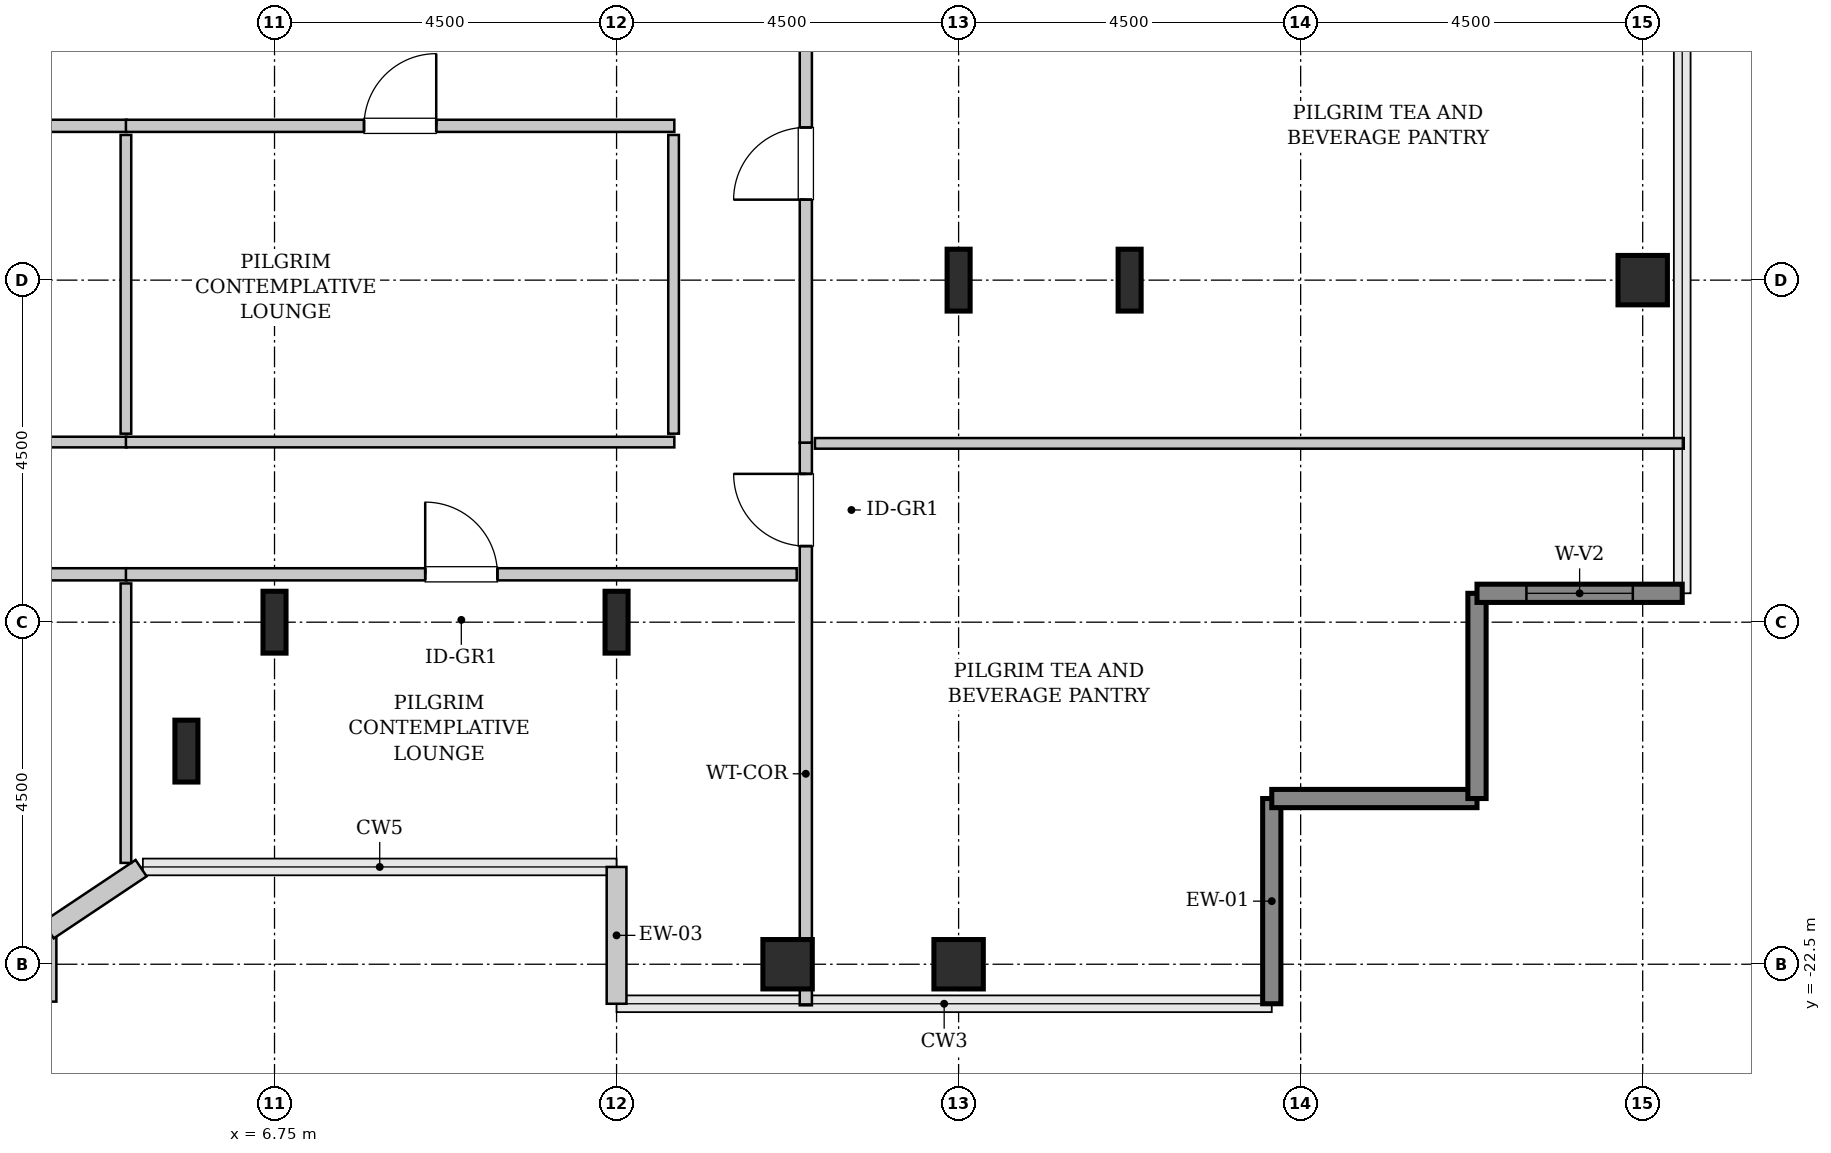
"""IFC4 building model, lengths in metres.
Left out: names, types, materials, properties, quantities, classifications, styles, units other than length and angle.
Written with IfcOpenShell. Run it as: python <this file> out.ifc"""

import sys

from ifc_helpers import new_model, si_unit, direction, frame, frame_2d, origin, origin_2d, place, context, subcontext, project, spatial, rectangle, hollow_rectangle, i_section, extrude, source, transform, mapped, element, fill, save


model = new_model("IFC4")
c1 = context("Model", 3, precision=1e-05, world=origin(), true_north=direction((0.0, 1.0)))
c2 = subcontext(c1, "Body", "Model", "MODEL_VIEW")
j1 = project(units=[si_unit("LENGTHUNIT", "METRE"), si_unit("PLANEANGLEUNIT", "RADIAN")], contexts=[c1])
p1 = place(None, origin())
s1 = spatial("IfcSite", under=j1, at=p1, CompositionType="ELEMENT")
p2 = place(p1, origin())
s2 = spatial("IfcBuilding", under=s1, at=p2, CompositionType="ELEMENT")
p3 = place(p2, frame((0.0, 0.0, 244.6)))
s3 = spatial("IfcBuildingStorey", under=s2, at=p3, CompositionType="ELEMENT", Elevation=244.6)
m1 = source(origin(), c2, "Body", "SweptSolid", [
    extrude(i_section(OverallWidth=0.303, OverallDepth=0.814, WebThickness=0.021, FlangeThickness=0.04, FilletRadius=0.03, at=origin_2d()), origin(), (0.0, 0.0, 1.0), 3.8),
])
for number, where, z_axis, x_axis in (
    (1, (5.591, -19.696, 0.0), (0.0, 0.0, 1.0), (1.0, 0.0, 0.0)),
    (2, (6.75, -18.0, 0.0), (0.0, 0.0, 1.0), (1.0, 0.0, 0.0)),
    (3, (11.25, -18.0, 0.0), (0.0, 0.0, 1.0), (1.0, 0.0, 0.0)),
):
    element("IfcColumn", number, at=place(p3, frame(where, z_axis=z_axis, x_axis=x_axis)), inside=s3, PredefinedType="COLUMN", context=c2, shape_type="MappedRepresentation", body=[
        mapped(m1, transform((0.0, 0.0, 0.0), x_axis=(1.0, 0.0, 0.0), y_axis=(0.0, 1.0, 0.0), z_axis=(0.0, 0.0, 1.0), scale=1.0)),
    ])
m2 = source(origin(), c2, "Body", "SweptSolid", [
    extrude(hollow_rectangle(XDim=0.65, YDim=0.65, WallThickness=0.032, InnerFilletRadius=0.032, OuterFilletRadius=0.064, at=origin_2d()), origin(), (0.0, 0.0, 1.0), 3.8),
])
for number, where, z_axis, x_axis in (
    (4, (13.5, -22.5, 0.0), (0.0, 0.0, 1.0), (1.0, 0.0, 0.0)),
    (5, (15.75, -22.5, 0.0), (0.0, 0.0, 1.0), (1.0, 0.0, 0.0)),
):
    element("IfcColumn", number, at=place(p3, frame(where, z_axis=z_axis, x_axis=x_axis)), inside=s3, PredefinedType="COLUMN", context=c2, shape_type="MappedRepresentation", body=[
        mapped(m2, transform((0.0, 0.0, 0.0), x_axis=(1.0, 0.0, 0.0), y_axis=(0.0, 1.0, 0.0), z_axis=(0.0, 0.0, 1.0), scale=1.0)),
    ])
for number, where, z_axis, x_axis in (
    (6, (15.75, -13.5, 0.0), (0.0, 0.0, 1.0), (1.0, 0.0, 0.0)),
    (7, (18.0, -13.5, 0.0), (0.0, 0.0, 1.0), (1.0, 0.0, 0.0)),
):
    element("IfcColumn", number, at=place(p3, frame(where, z_axis=z_axis, x_axis=x_axis)), inside=s3, PredefinedType="COLUMN", context=c2, shape_type="MappedRepresentation", body=[
        mapped(m1, transform((0.0, 0.0, 0.0), x_axis=(1.0, 0.0, 0.0), y_axis=(0.0, 1.0, 0.0), z_axis=(0.0, 0.0, 1.0), scale=1.0)),
    ])
p4 = place(p3, frame((24.75, -13.5, 0.0), z_axis=(0.0, 0.0, 1.0), x_axis=(1.0, 0.0, 0.0)))
e8 = element("IfcColumn", 8, at=p4, inside=s3, PredefinedType="COLUMN", context=c2, shape_type="MappedRepresentation", body=[
    mapped(m2, transform((0.0, 0.0, 0.0), x_axis=(1.0, 0.0, 0.0), y_axis=(0.0, 1.0, 0.0), z_axis=(0.0, 0.0, 1.0), scale=1.0)),
])
m3 = source(origin(), c2, "Body", "SweptSolid", [
    extrude(rectangle(XDim=1.8, YDim=0.26, at=frame_2d((0.9, 0.0))), origin(), (0.0, 0.0, 1.0), 3.55),
])
p5 = place(p3, frame((11.25, -21.22, 0.0), z_axis=(0.0, 0.0, 1.0), x_axis=(0.0, -1.0, 0.0)))
e9 = element("IfcWall", 9, at=p5, inside=s3, PredefinedType="SOLIDWALL", context=c2, shape_type="MappedRepresentation", body=[
    mapped(m3, transform((0.0, 0.0, 0.0), x_axis=(1.0, 0.0, 0.0), y_axis=(0.0, 1.0, 0.0), z_axis=(0.0, 0.0, 1.0), scale=1.0)),
])
m4 = source(origin(), c2, "Body", "SweptSolid", [
    extrude(rectangle(XDim=2.7, YDim=0.24, at=frame_2d((1.35, 0.0))), origin(), (0.0, 0.0, 1.0), 3.55),
])
for number, where, z_axis, x_axis in (
    (10, (19.87, -23.02, 0.0), (0.0, 0.0, 1.0), (0.0, 1.0, 0.0)),
    (11, (19.87, -20.32, 0.0), (0.0, 0.0, 1.0), (1.0, 0.0, 0.0)),
    (12, (22.57, -20.32, 0.0), (0.0, 0.0, 1.0), (0.0, 1.0, 0.0)),
):
    element("IfcWall", number, at=place(p3, frame(where, z_axis=z_axis, x_axis=x_axis)), inside=s3, PredefinedType="SHEAR", context=c2, shape_type="MappedRepresentation", body=[
        mapped(m4, transform((0.0, 0.0, 0.0), x_axis=(1.0, 0.0, 0.0), y_axis=(0.0, 1.0, 0.0), z_axis=(0.0, 0.0, 1.0), scale=1.0)),
    ])
p6 = place(p3, frame((22.57, -17.62, 0.0), z_axis=(0.0, 0.0, 1.0), x_axis=(1.0, 0.0, 0.0)))
e13 = element("IfcWall", 13, at=p6, inside=s3, PredefinedType="SHEAR", context=c2, shape_type="MappedRepresentation", body=[
    mapped(m4, transform((0.0, 0.0, 0.0), x_axis=(1.0, 0.0, 0.0), y_axis=(0.0, 1.0, 0.0), z_axis=(0.0, 0.0, 1.0), scale=1.0)),
])
p7 = place(p6, frame((0.65, 0.0, 0.85)))
e14 = element("IfcOpeningElement", 14, at=p7, cuts=e13, PredefinedType="OPENING", context=c2, shape_type="SweptSolid", body=[
    extrude(rectangle(XDim=1.4, YDim=1.8, at=frame_2d((0.7, 0.9))), frame((0.0, 0.13, 0.0), z_axis=(0.0, -1.0, 0.0), x_axis=(1.0, 0.0, 0.0)), (0.0, 0.0, 1.0), 0.26),
])
m5 = source(origin(), c2, "Body", "SweptSolid", [
    extrude(rectangle(XDim=0.897, YDim=0.26, at=frame_2d((0.448, 0.0))), origin(), (0.0, 0.0, 1.0), 3.55),
])
p8 = place(p3, frame((3.75, -22.992, 0.0), z_axis=(0.0, 0.0, 1.0), x_axis=(0.0, 1.0, 0.0)))
e15 = element("IfcWall", 15, at=p8, inside=s3, PredefinedType="SOLIDWALL", context=c2, shape_type="MappedRepresentation", body=[
    mapped(m5, transform((0.0, 0.0, 0.0), x_axis=(1.0, 0.0, 0.0), y_axis=(0.0, 1.0, 0.0), z_axis=(0.0, 0.0, 1.0), scale=1.0)),
])
m6 = source(origin(), c2, "Body", "SweptSolid", [
    extrude(rectangle(XDim=1.469, YDim=0.26, at=frame_2d((0.734, 0.0))), origin(), (0.0, 0.0, 1.0), 3.55),
])
p9 = place(p3, frame((3.773, -22.052, 0.0), z_axis=(0.0, 0.0, 1.0), x_axis=(0.831461760506, 0.555581983884, 0.0)))
e16 = element("IfcWall", 16, at=p9, inside=s3, PredefinedType="SOLIDWALL", context=c2, shape_type="MappedRepresentation", body=[
    mapped(m6, transform((0.0, 0.0, 0.0), x_axis=(1.0, 0.0, 0.0), y_axis=(0.0, 1.0, 0.0), z_axis=(0.0, 0.0, 1.0), scale=1.0)),
])
m7 = source(origin(), c2, "Body", "SweptSolid", [
    extrude(rectangle(XDim=7.403, YDim=0.16, at=frame_2d((3.701, 0.0))), origin(), (0.0, 0.0, 1.0), 3.535),
])
p10 = place(p3, frame((13.74, -23.04, 0.0), z_axis=(0.0, 0.0, 1.0), x_axis=(0.0, 1.0, 0.0)))
e17 = element("IfcWall", 17, at=p10, inside=s3, PredefinedType="PARTITIONING", context=c2, shape_type="MappedRepresentation", body=[
    mapped(m7, transform((0.0, 0.0, 0.0), x_axis=(1.0, 0.0, 0.0), y_axis=(0.0, 1.0, 0.0), z_axis=(0.0, 0.0, 1.0), scale=1.0)),
])
p11 = place(p10, frame((6.041, 0.0, 0.0)))
e18 = element("IfcOpeningElement", 18, at=p11, cuts=e17, PredefinedType="OPENING", context=c2, shape_type="SweptSolid", body=[
    extrude(rectangle(XDim=0.95, YDim=2.1, at=frame_2d((0.475, 1.05))), frame((0.0, 0.09, 0.0), z_axis=(0.0, -1.0, 0.0), x_axis=(1.0, 0.0, 0.0)), (0.0, 0.0, 1.0), 0.18),
])
m8 = source(origin(), c2, "Body", "SweptSolid", [
    extrude(rectangle(XDim=11.43, YDim=0.14, at=frame_2d((5.715, 0.0))), origin(), (0.0, 0.0, 1.0), 3.535),
])
p12 = place(p3, frame((13.86, -15.647, 0.0), z_axis=(0.0, 0.0, 1.0), x_axis=(1.0, 0.0, 0.0)))
e19 = element("IfcWall", 19, at=p12, inside=s3, PredefinedType="PARTITIONING", context=c2, shape_type="MappedRepresentation", body=[
    mapped(m8, transform((0.0, 0.0, 0.0), x_axis=(1.0, 0.0, 0.0), y_axis=(0.0, 1.0, 0.0), z_axis=(0.0, 0.0, 1.0), scale=1.0)),
])
m9 = source(origin(), c2, "Body", "SweptSolid", [
    extrude(rectangle(XDim=7.343, YDim=0.16, at=frame_2d((3.671, 0.0))), origin(), (0.0, 0.0, 1.0), 3.535),
])
p13 = place(p3, frame((13.74, -15.637, 0.0), z_axis=(0.0, 0.0, 1.0), x_axis=(0.0, 1.0, 0.0)))
e20 = element("IfcWall", 20, at=p13, inside=s3, PredefinedType="PARTITIONING", context=c2, shape_type="MappedRepresentation", body=[
    mapped(m9, transform((0.0, 0.0, 0.0), x_axis=(1.0, 0.0, 0.0), y_axis=(0.0, 1.0, 0.0), z_axis=(0.0, 0.0, 1.0), scale=1.0)),
])
p14 = place(p13, frame((3.196, 0.0, 0.0)))
e21 = element("IfcOpeningElement", 21, at=p14, cuts=e20, PredefinedType="OPENING", context=c2, shape_type="SweptSolid", body=[
    extrude(rectangle(XDim=0.95, YDim=2.1, at=frame_2d((0.475, 1.05))), frame((0.0, 0.09, 0.0), z_axis=(0.0, -1.0, 0.0), x_axis=(1.0, 0.0, 0.0)), (0.0, 0.0, 1.0), 0.18),
])
m10 = source(origin(), c2, "Body", "SweptSolid", [
    extrude(rectangle(XDim=12.21, YDim=0.16, at=frame_2d((6.105, 0.0))), origin(), (0.0, 0.0, 1.0), 3.535),
])
p15 = place(p3, frame((-7.405, -17.37, 0.0), z_axis=(0.0, 0.0, 1.0), x_axis=(1.0, 0.0, 0.0)))
e22 = element("IfcWall", 22, at=p15, inside=s3, PredefinedType="PARTITIONING", context=c2, shape_type="MappedRepresentation", body=[
    mapped(m10, transform((0.0, 0.0, 0.0), x_axis=(1.0, 0.0, 0.0), y_axis=(0.0, 1.0, 0.0), z_axis=(0.0, 0.0, 1.0), scale=1.0)),
])
p16 = place(p15, frame((5.63, 0.0, 0.0)))
e23 = element("IfcOpeningElement", 23, at=p16, cuts=e22, PredefinedType="OPENING", context=c2, shape_type="SweptSolid", body=[
    extrude(rectangle(XDim=0.95, YDim=2.1, at=frame_2d((0.475, 1.05))), frame((0.0, 0.09, 0.0), z_axis=(0.0, -1.0, 0.0), x_axis=(1.0, 0.0, 0.0)), (0.0, 0.0, 1.0), 0.18),
])
m11 = source(origin(), c2, "Body", "SweptSolid", [
    extrude(rectangle(XDim=3.677, YDim=0.14, at=frame_2d((1.838, 0.0))), origin(), (0.0, 0.0, 1.0), 3.535),
])
p17 = place(p3, frame((4.795, -21.167, 0.0), z_axis=(0.0, 0.0, 1.0), x_axis=(0.0, 1.0, 0.0)))
e24 = element("IfcWall", 24, at=p17, inside=s3, PredefinedType="PARTITIONING", context=c2, shape_type="MappedRepresentation", body=[
    mapped(m11, transform((0.0, 0.0, 0.0), x_axis=(1.0, 0.0, 0.0), y_axis=(0.0, 1.0, 0.0), z_axis=(0.0, 0.0, 1.0), scale=1.0)),
])
p18 = place(p3, frame((-7.405, -11.47, 0.0), z_axis=(0.0, 0.0, 1.0), x_axis=(1.0, 0.0, 0.0)))
e25 = element("IfcWall", 25, at=p18, inside=s3, PredefinedType="PARTITIONING", context=c2, shape_type="MappedRepresentation", body=[
    mapped(m10, transform((0.0, 0.0, 0.0), x_axis=(1.0, 0.0, 0.0), y_axis=(0.0, 1.0, 0.0), z_axis=(0.0, 0.0, 1.0), scale=1.0)),
])
p19 = place(p18, frame((5.63, 0.0, 0.0)))
e26 = element("IfcOpeningElement", 26, at=p19, cuts=e25, PredefinedType="OPENING", context=c2, shape_type="SweptSolid", body=[
    extrude(rectangle(XDim=0.95, YDim=2.1, at=frame_2d((0.475, 1.05))), frame((0.0, 0.09, 0.0), z_axis=(0.0, -1.0, 0.0), x_axis=(1.0, 0.0, 0.0)), (0.0, 0.0, 1.0), 0.18),
])
m12 = source(origin(), c2, "Body", "SweptSolid", [
    extrude(rectangle(XDim=12.21, YDim=0.14, at=frame_2d((6.105, 0.0))), origin(), (0.0, 0.0, 1.0), 3.535),
])
p20 = place(p3, frame((-7.405, -15.63, 0.0), z_axis=(0.0, 0.0, 1.0), x_axis=(1.0, 0.0, 0.0)))
e27 = element("IfcWall", 27, at=p20, inside=s3, PredefinedType="PARTITIONING", context=c2, shape_type="MappedRepresentation", body=[
    mapped(m12, transform((0.0, 0.0, 0.0), x_axis=(1.0, 0.0, 0.0), y_axis=(0.0, 1.0, 0.0), z_axis=(0.0, 0.0, 1.0), scale=1.0)),
])
m13 = source(origin(), c2, "Body", "SweptSolid", [
    extrude(rectangle(XDim=3.93, YDim=0.14, at=frame_2d((1.965, 0.0))), origin(), (0.0, 0.0, 1.0), 3.535),
])
p21 = place(p3, frame((4.795, -15.52, 0.0), z_axis=(0.0, 0.0, 1.0), x_axis=(0.0, 1.0, 0.0)))
e28 = element("IfcWall", 28, at=p21, inside=s3, PredefinedType="PARTITIONING", context=c2, shape_type="MappedRepresentation", body=[
    mapped(m13, transform((0.0, 0.0, 0.0), x_axis=(1.0, 0.0, 0.0), y_axis=(0.0, 1.0, 0.0), z_axis=(0.0, 0.0, 1.0), scale=1.0)),
])
m14 = source(origin(), c2, "Body", "SweptSolid", [
    extrude(rectangle(XDim=8.825, YDim=0.16, at=frame_2d((4.413, 0.0))), origin(), (0.0, 0.0, 1.0), 3.535),
])
p22 = place(p3, frame((4.795, -17.37, 0.0), z_axis=(0.0, 0.0, 1.0), x_axis=(1.0, 0.0, 0.0)))
e29 = element("IfcWall", 29, at=p22, inside=s3, PredefinedType="PARTITIONING", context=c2, shape_type="MappedRepresentation", body=[
    mapped(m14, transform((0.0, 0.0, 0.0), x_axis=(1.0, 0.0, 0.0), y_axis=(0.0, 1.0, 0.0), z_axis=(0.0, 0.0, 1.0), scale=1.0)),
])
p23 = place(p22, frame((3.938, 0.0, 0.0)))
e30 = element("IfcOpeningElement", 30, at=p23, cuts=e29, PredefinedType="OPENING", context=c2, shape_type="SweptSolid", body=[
    extrude(rectangle(XDim=0.95, YDim=2.1, at=frame_2d((0.475, 1.05))), frame((0.0, 0.09, 0.0), z_axis=(0.0, -1.0, 0.0), x_axis=(1.0, 0.0, 0.0)), (0.0, 0.0, 1.0), 0.18),
])
m15 = source(origin(), c2, "Body", "SweptSolid", [
    extrude(rectangle(XDim=7.215, YDim=0.16, at=frame_2d((3.607, 0.0))), origin(), (0.0, 0.0, 1.0), 3.535),
])
p24 = place(p3, frame((4.795, -11.47, 0.0), z_axis=(0.0, 0.0, 1.0), x_axis=(1.0, 0.0, 0.0)))
e31 = element("IfcWall", 31, at=p24, inside=s3, PredefinedType="PARTITIONING", context=c2, shape_type="MappedRepresentation", body=[
    mapped(m15, transform((0.0, 0.0, 0.0), x_axis=(1.0, 0.0, 0.0), y_axis=(0.0, 1.0, 0.0), z_axis=(0.0, 0.0, 1.0), scale=1.0)),
])
p25 = place(p24, frame((3.133, 0.0, 0.0)))
e32 = element("IfcOpeningElement", 32, at=p25, cuts=e31, PredefinedType="OPENING", context=c2, shape_type="SweptSolid", body=[
    extrude(rectangle(XDim=0.95, YDim=2.1, at=frame_2d((0.475, 1.05))), frame((0.0, 0.09, 0.0), z_axis=(0.0, -1.0, 0.0), x_axis=(1.0, 0.0, 0.0)), (0.0, 0.0, 1.0), 0.18),
])
m16 = source(origin(), c2, "Body", "SweptSolid", [
    extrude(rectangle(XDim=7.215, YDim=0.14, at=frame_2d((3.607, 0.0))), origin(), (0.0, 0.0, 1.0), 3.535),
])
p26 = place(p3, frame((4.795, -15.63, 0.0), z_axis=(0.0, 0.0, 1.0), x_axis=(1.0, 0.0, 0.0)))
e33 = element("IfcWall", 33, at=p26, inside=s3, PredefinedType="PARTITIONING", context=c2, shape_type="MappedRepresentation", body=[
    mapped(m16, transform((0.0, 0.0, 0.0), x_axis=(1.0, 0.0, 0.0), y_axis=(0.0, 1.0, 0.0), z_axis=(0.0, 0.0, 1.0), scale=1.0)),
])
p27 = place(p3, frame((12.0, -15.52, 0.0), z_axis=(0.0, 0.0, 1.0), x_axis=(0.0, 1.0, 0.0)))
e34 = element("IfcWall", 34, at=p27, inside=s3, PredefinedType="PARTITIONING", context=c2, shape_type="MappedRepresentation", body=[
    mapped(m13, transform((0.0, 0.0, 0.0), x_axis=(1.0, 0.0, 0.0), y_axis=(0.0, 1.0, 0.0), z_axis=(0.0, 0.0, 1.0), scale=1.0)),
])
m17 = source(origin(), c2, "Body", "SweptSolid", [
    extrude(rectangle(XDim=1.4, YDim=1.8, at=frame_2d((0.7, 0.9))), frame((0.0, 0.03, 0.0), z_axis=(0.0, -1.0, 0.0), x_axis=(1.0, 0.0, 0.0)), (0.0, 0.0, 1.0), 0.06),
])
p28 = place(p7, origin())
e35 = element("IfcWindow", 35, at=p28, inside=s3, PartitioningType="SINGLE_PANEL", PredefinedType="WINDOW", context=c2, shape_type="MappedRepresentation", body=[
    mapped(m17, transform((0.0, 0.0, 0.0), x_axis=(1.0, 0.0, 0.0), y_axis=(0.0, 1.0, 0.0), z_axis=(0.0, 0.0, 1.0), scale=1.0)),
])
fill(e14, e35)
m18 = source(origin(), c2, "Body", "SweptSolid", [
    extrude(rectangle(XDim=0.95, YDim=2.1, at=frame_2d((0.475, 1.05))), frame((0.0, 0.025, 0.0), z_axis=(0.0, -1.0, 0.0), x_axis=(1.0, 0.0, 0.0)), (0.0, 0.0, 1.0), 0.05),
])
p29 = place(p11, origin())
e36 = element("IfcDoor", 36, at=p29, inside=s3, OperationType="SINGLE_SWING_RIGHT", PredefinedType="DOOR", context=c2, shape_type="MappedRepresentation", body=[
    mapped(m18, transform((0.0, 0.0, 0.0), x_axis=(1.0, 0.0, 0.0), y_axis=(0.0, 1.0, 0.0), z_axis=(0.0, 0.0, 1.0), scale=1.0)),
])
fill(e18, e36)
p30 = place(p14, origin())
e37 = element("IfcDoor", 37, at=p30, inside=s3, OperationType="SINGLE_SWING_LEFT", PredefinedType="DOOR", context=c2, shape_type="MappedRepresentation", body=[
    mapped(m18, transform((0.0, 0.0, 0.0), x_axis=(1.0, 0.0, 0.0), y_axis=(0.0, 1.0, 0.0), z_axis=(0.0, 0.0, 1.0), scale=1.0)),
])
fill(e21, e37)
p31 = place(p23, origin())
e38 = element("IfcDoor", 38, at=p31, inside=s3, OperationType="SINGLE_SWING_LEFT", PredefinedType="DOOR", context=c2, shape_type="MappedRepresentation", body=[
    mapped(m18, transform((0.0, 0.0, 0.0), x_axis=(1.0, 0.0, 0.0), y_axis=(0.0, 1.0, 0.0), z_axis=(0.0, 0.0, 1.0), scale=1.0)),
])
fill(e30, e38)
p32 = place(p25, origin())
e39 = element("IfcDoor", 39, at=p32, inside=s3, OperationType="SINGLE_SWING_RIGHT", PredefinedType="DOOR", context=c2, shape_type="MappedRepresentation", body=[
    mapped(m18, transform((0.0, 0.0, 0.0), x_axis=(1.0, 0.0, 0.0), y_axis=(0.0, 1.0, 0.0), z_axis=(0.0, 0.0, 1.0), scale=1.0)),
])
fill(e32, e39)
save(model, sys.argv[1])
